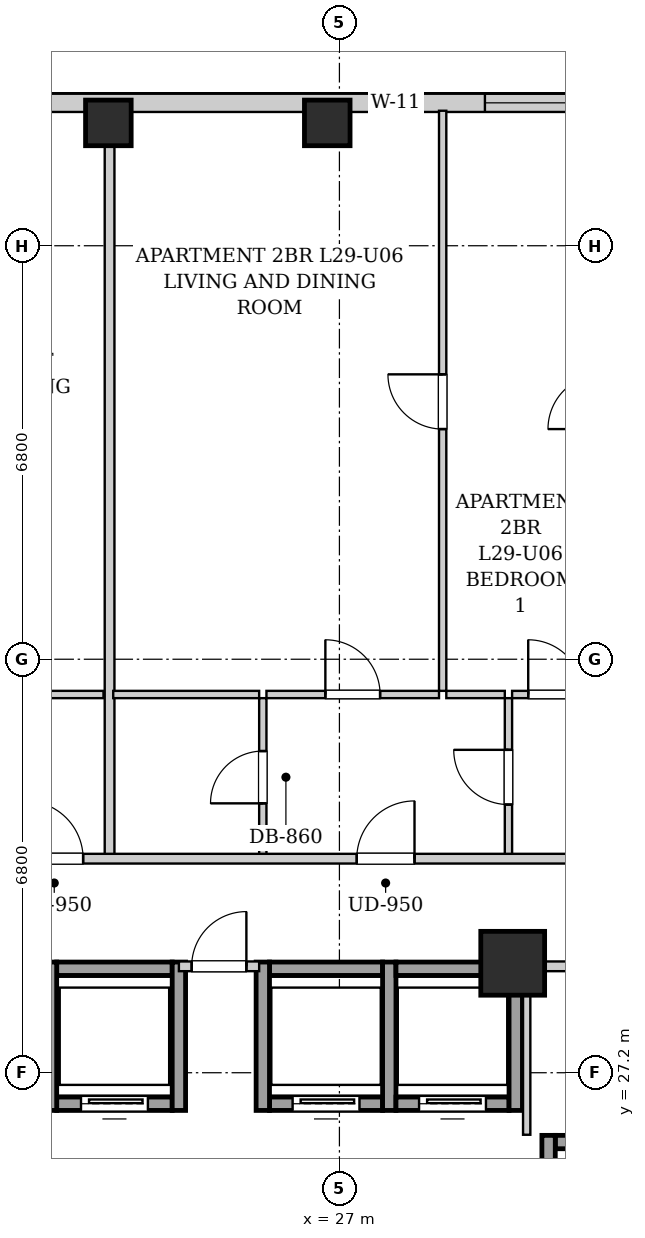
"""IFC4 building model, lengths in metres.
Left out: names, types, materials, properties, quantities, classifications, styles, units other than length and angle.
Written with IfcOpenShell. Run it as: python <this file> out.ifc"""

import sys

from ifc_helpers import new_model, si_unit, direction, frame, frame_2d, origin, origin_2d, place, context, subcontext, project, spatial, rectangle, extrude, element, fill, save


model = new_model("IFC4")
c1 = context("Model", 3, precision=1e-05, world=origin(), true_north=direction((0.0, 1.0)))
c2 = subcontext(c1, "Body", "Model", "MODEL_VIEW")
j1 = project(units=[si_unit("LENGTHUNIT", "METRE"), si_unit("PLANEANGLEUNIT", "RADIAN")], contexts=[c1])
p1 = place(None, origin())
s1 = spatial("IfcSite", under=j1, at=p1, CompositionType="ELEMENT")
p2 = place(p1, origin())
s2 = spatial("IfcBuilding", under=s1, at=p2, CompositionType="ELEMENT")
p3 = place(p2, frame((0.0, 0.0, 103.9)))
s3 = spatial("IfcBuildingStorey", under=s2, at=p3, CompositionType="ELEMENT", Elevation=103.9)
for number, where, z_axis, x_axis in (
    (1, (23.2, 42.82, 0.0), (0.0, 0.0, 1.0), (1.0, 0.0, 0.0)),
    (2, (26.8, 42.82, 0.0), (0.0, 0.0, 1.0), (1.0, 0.0, 0.0)),
):
    element("IfcColumn", number, at=place(p3, frame(where, z_axis=z_axis, x_axis=x_axis)), inside=s3, PredefinedType="COLUMN", context=c2, shape_type="SweptSolid", body=[
        extrude(rectangle(XDim=0.75, YDim=0.75, at=origin_2d()), origin(), (0.0, 0.0, 1.0), 3.2),
    ])
p4 = place(p3, frame((29.85, 29.0, 0.0), z_axis=(0.0, 0.0, 1.0), x_axis=(1.0, 0.0, 0.0)))
e3 = element("IfcColumn", 3, at=p4, inside=s3, PredefinedType="COLUMN", context=c2, shape_type="SweptSolid", body=[
    extrude(rectangle(XDim=1.05, YDim=1.05, at=origin_2d()), origin(), (0.0, 0.0, 1.0), 3.2),
])
p5 = place(p3, frame((10.0, 43.15, 0.0), z_axis=(0.0, 0.0, 1.0), x_axis=(1.0, 0.0, 0.0)))
e4 = element("IfcWall", 4, at=p5, inside=s3, PredefinedType="SOLIDWALL", context=c2, shape_type="SweptSolid", body=[
    extrude(rectangle(XDim=23.15, YDim=0.3, at=frame_2d((11.575, 0.0))), origin(), (0.0, 0.0, 1.0), 2.94),
])
p6 = place(p5, frame((4.735, 0.0, 0.55)))
e5 = element("IfcOpeningElement", 5, at=p6, cuts=e4, PredefinedType="OPENING", context=c2, shape_type="SweptSolid", body=[
    extrude(rectangle(XDim=1.35, YDim=1.2, at=frame_2d((0.675, 0.6))), frame((0.0, 0.16, 0.0), z_axis=(0.0, -1.0, 0.0), x_axis=(1.0, 0.0, 0.0)), (0.0, 0.0, 1.0), 0.32),
])
p7 = place(p5, frame((1.27, 0.0, 0.55)))
e6 = element("IfcOpeningElement", 6, at=p7, cuts=e4, PredefinedType="OPENING", context=c2, shape_type="SweptSolid", body=[
    extrude(rectangle(XDim=1.35, YDim=1.2, at=frame_2d((0.675, 0.6))), frame((0.0, 0.16, 0.0), z_axis=(0.0, -1.0, 0.0), x_axis=(1.0, 0.0, 0.0)), (0.0, 0.0, 1.0), 0.32),
])
p8 = place(p5, frame((9.773, 0.0, 0.55)))
e7 = element("IfcOpeningElement", 7, at=p8, cuts=e4, PredefinedType="OPENING", context=c2, shape_type="SweptSolid", body=[
    extrude(rectangle(XDim=1.35, YDim=1.2, at=frame_2d((0.675, 0.6))), frame((0.0, 0.16, 0.0), z_axis=(0.0, -1.0, 0.0), x_axis=(1.0, 0.0, 0.0)), (0.0, 0.0, 1.0), 0.32),
])
p9 = place(p5, frame((17.5, 0.0, 0.55)))
e8 = element("IfcOpeningElement", 8, at=p9, cuts=e4, PredefinedType="OPENING", context=c2, shape_type="SweptSolid", body=[
    extrude(rectangle(XDim=0.85, YDim=1.2, at=frame_2d((0.425, 0.6))), frame((0.0, 0.16, 0.0), z_axis=(0.0, -1.0, 0.0), x_axis=(1.0, 0.0, 0.0)), (0.0, 0.0, 1.0), 0.32),
])
p10 = place(p5, frame((19.393, 0.0, 0.55)))
e9 = element("IfcOpeningElement", 9, at=p10, cuts=e4, PredefinedType="OPENING", context=c2, shape_type="SweptSolid", body=[
    extrude(rectangle(XDim=1.35, YDim=1.2, at=frame_2d((0.675, 0.6))), frame((0.0, 0.16, 0.0), z_axis=(0.0, -1.0, 0.0), x_axis=(1.0, 0.0, 0.0)), (0.0, 0.0, 1.0), 0.32),
])
p11 = place(p3, frame((22.35, 26.69, 0.0), z_axis=(0.0, 0.0, 1.0), x_axis=(1.0, 0.0, 0.0)))
e10 = element("IfcWall", 10, at=p11, inside=s3, PredefinedType="SHEAR", context=c2, shape_type="SweptSolid", body=[
    extrude(rectangle(XDim=1.9, YDim=0.22, at=frame_2d((0.95, 0.0))), origin(), (0.0, 0.0, 1.0), 2.94),
])
p12 = place(p11, frame((0.4, 0.0, 0.0)))
e11 = element("IfcOpeningElement", 11, at=p12, cuts=e10, PredefinedType="OPENING", context=c2, shape_type="SweptSolid", body=[
    extrude(rectangle(XDim=1.1, YDim=2.15, at=frame_2d((0.55, 1.075))), frame((0.0, 0.12, 0.0), z_axis=(0.0, -1.0, 0.0), x_axis=(1.0, 0.0, 0.0)), (0.0, 0.0, 1.0), 0.24),
])
p13 = place(p3, frame((22.35, 28.91, 0.0), z_axis=(0.0, 0.0, 1.0), x_axis=(1.0, 0.0, 0.0)))
e12 = element("IfcWall", 12, at=p13, inside=s3, PredefinedType="SHEAR", context=c2, shape_type="SweptSolid", body=[
    extrude(rectangle(XDim=1.9, YDim=0.22, at=frame_2d((0.95, 0.0))), origin(), (0.0, 0.0, 1.0), 2.94),
])
for number, where, z_axis, x_axis in (
    (13, (22.24, 26.58, 0.0), (0.0, 0.0, 1.0), (0.0, 1.0, 0.0)),
    (14, (24.36, 26.58, 0.0), (0.0, 0.0, 1.0), (0.0, 1.0, 0.0)),
):
    element("IfcWall", number, at=place(p3, frame(where, z_axis=z_axis, x_axis=x_axis)), inside=s3, PredefinedType="SHEAR", context=c2, shape_type="SweptSolid", body=[
        extrude(rectangle(XDim=2.44, YDim=0.22, at=frame_2d((1.22, 0.0))), origin(), (0.0, 0.0, 1.0), 2.94),
    ])
p14 = place(p3, frame((25.85, 26.69, 0.0), z_axis=(0.0, 0.0, 1.0), x_axis=(1.0, 0.0, 0.0)))
e15 = element("IfcWall", 15, at=p14, inside=s3, PredefinedType="SHEAR", context=c2, shape_type="SweptSolid", body=[
    extrude(rectangle(XDim=1.86, YDim=0.22, at=frame_2d((0.93, 0.0))), origin(), (0.0, 0.0, 1.0), 2.94),
])
p15 = place(p14, frame((0.38, 0.0, 0.0)))
e16 = element("IfcOpeningElement", 16, at=p15, cuts=e15, PredefinedType="OPENING", context=c2, shape_type="SweptSolid", body=[
    extrude(rectangle(XDim=1.1, YDim=2.15, at=frame_2d((0.55, 1.075))), frame((0.0, 0.12, 0.0), z_axis=(0.0, -1.0, 0.0), x_axis=(1.0, 0.0, 0.0)), (0.0, 0.0, 1.0), 0.24),
])
p16 = place(p3, frame((25.85, 28.91, 0.0), z_axis=(0.0, 0.0, 1.0), x_axis=(1.0, 0.0, 0.0)))
e17 = element("IfcWall", 17, at=p16, inside=s3, PredefinedType="SHEAR", context=c2, shape_type="SweptSolid", body=[
    extrude(rectangle(XDim=1.86, YDim=0.22, at=frame_2d((0.93, 0.0))), origin(), (0.0, 0.0, 1.0), 2.94),
])
for number, where, z_axis, x_axis in (
    (18, (25.74, 26.58, 0.0), (0.0, 0.0, 1.0), (0.0, 1.0, 0.0)),
    (19, (27.82, 26.58, 0.0), (0.0, 0.0, 1.0), (0.0, 1.0, 0.0)),
):
    element("IfcWall", number, at=place(p3, frame(where, z_axis=z_axis, x_axis=x_axis)), inside=s3, PredefinedType="SHEAR", context=c2, shape_type="SweptSolid", body=[
        extrude(rectangle(XDim=2.44, YDim=0.22, at=frame_2d((1.22, 0.0))), origin(), (0.0, 0.0, 1.0), 2.94),
    ])
p17 = place(p3, frame((27.93, 26.69, 0.0), z_axis=(0.0, 0.0, 1.0), x_axis=(1.0, 0.0, 0.0)))
e20 = element("IfcWall", 20, at=p17, inside=s3, PredefinedType="SHEAR", context=c2, shape_type="SweptSolid", body=[
    extrude(rectangle(XDim=1.86, YDim=0.22, at=frame_2d((0.93, 0.0))), origin(), (0.0, 0.0, 1.0), 2.94),
])
p18 = place(p17, frame((0.38, 0.0, 0.0)))
e21 = element("IfcOpeningElement", 21, at=p18, cuts=e20, PredefinedType="OPENING", context=c2, shape_type="SweptSolid", body=[
    extrude(rectangle(XDim=1.1, YDim=2.15, at=frame_2d((0.55, 1.075))), frame((0.0, 0.12, 0.0), z_axis=(0.0, -1.0, 0.0), x_axis=(1.0, 0.0, 0.0)), (0.0, 0.0, 1.0), 0.24),
])
p19 = place(p3, frame((27.93, 28.91, 0.0), z_axis=(0.0, 0.0, 1.0), x_axis=(1.0, 0.0, 0.0)))
e22 = element("IfcWall", 22, at=p19, inside=s3, PredefinedType="SHEAR", context=c2, shape_type="SweptSolid", body=[
    extrude(rectangle(XDim=1.86, YDim=0.22, at=frame_2d((0.93, 0.0))), origin(), (0.0, 0.0, 1.0), 2.94),
])
p20 = place(p3, frame((29.9, 26.58, 0.0), z_axis=(0.0, 0.0, 1.0), x_axis=(0.0, 1.0, 0.0)))
e23 = element("IfcWall", 23, at=p20, inside=s3, PredefinedType="SHEAR", context=c2, shape_type="SweptSolid", body=[
    extrude(rectangle(XDim=2.44, YDim=0.22, at=frame_2d((1.22, 0.0))), origin(), (0.0, 0.0, 1.0), 2.94),
])
p21 = place(p3, frame((30.55, 26.06, 0.0), z_axis=(0.0, 0.0, 1.0), x_axis=(1.0, 0.0, 0.0)))
e24 = element("IfcWall", 24, at=p21, inside=s3, PredefinedType="SHEAR", context=c2, shape_type="SweptSolid", body=[
    extrude(rectangle(XDim=1.9, YDim=0.22, at=frame_2d((0.95, 0.0))), origin(), (0.0, 0.0, 1.0), 2.94),
])
p22 = place(p3, frame((30.44, 24.1, 0.0), z_axis=(0.0, 0.0, 1.0), x_axis=(0.0, 1.0, 0.0)))
e25 = element("IfcWall", 25, at=p22, inside=s3, PredefinedType="SHEAR", context=c2, shape_type="SweptSolid", body=[
    extrude(rectangle(XDim=2.07, YDim=0.22, at=frame_2d((1.035, 0.0))), origin(), (0.0, 0.0, 1.0), 2.94),
])
p23 = place(p3, frame((24.36, 28.95, 0.0), z_axis=(0.0, 0.0, 1.0), x_axis=(1.0, 0.0, 0.0)))
e26 = element("IfcWall", 26, at=p23, inside=s3, PredefinedType="PARTITIONING", context=c2, shape_type="SweptSolid", body=[
    extrude(rectangle(XDim=1.32, YDim=0.16, at=frame_2d((0.66, 0.0))), origin(), (0.0, 0.0, 1.0), 2.313),
])
p24 = place(p23, frame((0.21, 0.0, 0.0)))
e27 = element("IfcOpeningElement", 27, at=p24, cuts=e26, PredefinedType="OPENING", context=c2, shape_type="SweptSolid", body=[
    extrude(rectangle(XDim=0.9, YDim=2.05, at=frame_2d((0.45, 1.025))), frame((0.0, 0.09, 0.0), z_axis=(0.0, -1.0, 0.0), x_axis=(1.0, 0.0, 0.0)), (0.0, 0.0, 1.0), 0.18),
])
p25 = place(p3, frame((30.08, 26.18, 0.0), z_axis=(0.0, 0.0, 1.0), x_axis=(0.0, 1.0, 0.0)))
e28 = element("IfcWall", 28, at=p25, inside=s3, PredefinedType="PARTITIONING", context=c2, shape_type="SweptSolid", body=[
    extrude(rectangle(XDim=2.68, YDim=0.12, at=frame_2d((1.34, 0.0))), origin(), (0.0, 0.0, 1.0), 2.94),
])
p26 = place(p3, frame((30.08, 28.95, 0.0), z_axis=(0.0, 0.0, 1.0), x_axis=(1.0, 0.0, 0.0)))
e29 = element("IfcWall", 29, at=p26, inside=s3, PredefinedType="PARTITIONING", context=c2, shape_type="SweptSolid", body=[
    extrude(rectangle(XDim=2.96, YDim=0.16, at=frame_2d((1.48, 0.0))), origin(), (0.0, 0.0, 1.0), 2.94),
])
p27 = place(p26, frame((1.045, 0.0, 0.0)))
e30 = element("IfcOpeningElement", 30, at=p27, cuts=e29, PredefinedType="OPENING", context=c2, shape_type="SweptSolid", body=[
    extrude(rectangle(XDim=0.86, YDim=2.05, at=frame_2d((0.43, 1.025))), frame((0.0, 0.09, 0.0), z_axis=(0.0, -1.0, 0.0), x_axis=(1.0, 0.0, 0.0)), (0.0, 0.0, 1.0), 0.18),
])
p28 = place(p3, frame((19.85, 33.42, 0.0), z_axis=(0.0, 0.0, 1.0), x_axis=(1.0, 0.0, 0.0)))
e31 = element("IfcWall", 31, at=p28, inside=s3, PredefinedType="PARTITIONING", context=c2, shape_type="SweptSolid", body=[
    extrude(rectangle(XDim=3.27, YDim=0.12, at=frame_2d((1.635, 0.0))), origin(), (0.0, 0.0, 1.0), 2.94),
])
p29 = place(p28, frame((1.185, 0.0, 0.0)))
e32 = element("IfcOpeningElement", 32, at=p29, cuts=e31, PredefinedType="OPENING", context=c2, shape_type="SweptSolid", body=[
    extrude(rectangle(XDim=0.9, YDim=2.05, at=frame_2d((0.45, 1.025))), frame((0.0, 0.07, 0.0), z_axis=(0.0, -1.0, 0.0), x_axis=(1.0, 0.0, 0.0)), (0.0, 0.0, 1.0), 0.14),
])
p30 = place(p3, frame((23.22, 30.76, 0.0), z_axis=(0.0, 0.0, 1.0), x_axis=(0.0, 1.0, 0.0)))
e33 = element("IfcWall", 33, at=p30, inside=s3, PredefinedType="PARTITIONING", context=c2, shape_type="SweptSolid", body=[
    extrude(rectangle(XDim=12.26, YDim=0.16, at=frame_2d((6.13, 0.0))), origin(), (0.0, 0.0, 1.0), 2.94),
])
p31 = place(p3, frame((25.74, 30.76, 0.0), z_axis=(0.0, 0.0, 1.0), x_axis=(0.0, 1.0, 0.0)))
e34 = element("IfcWall", 34, at=p31, inside=s3, PredefinedType="PARTITIONING", context=c2, shape_type="SweptSolid", body=[
    extrude(rectangle(XDim=2.6, YDim=0.12, at=frame_2d((1.3, 0.0))), origin(), (0.0, 0.0, 1.0), 2.94),
])
p32 = place(p31, frame((0.87, 0.0, 0.0)))
e35 = element("IfcOpeningElement", 35, at=p32, cuts=e34, PredefinedType="OPENING", context=c2, shape_type="SweptSolid", body=[
    extrude(rectangle(XDim=0.86, YDim=2.05, at=frame_2d((0.43, 1.025))), frame((0.0, 0.07, 0.0), z_axis=(0.0, -1.0, 0.0), x_axis=(1.0, 0.0, 0.0)), (0.0, 0.0, 1.0), 0.14),
])
p33 = place(p3, frame((23.28, 33.42, 0.0), z_axis=(0.0, 0.0, 1.0), x_axis=(1.0, 0.0, 0.0)))
e36 = element("IfcWall", 36, at=p33, inside=s3, PredefinedType="PARTITIONING", context=c2, shape_type="SweptSolid", body=[
    extrude(rectangle(XDim=2.4, YDim=0.12, at=frame_2d((1.2, 0.0))), origin(), (0.0, 0.0, 1.0), 2.94),
])
p34 = place(p3, frame((29.78, 30.76, 0.0), z_axis=(0.0, 0.0, 1.0), x_axis=(0.0, 1.0, 0.0)))
e37 = element("IfcWall", 37, at=p34, inside=s3, PredefinedType="PARTITIONING", context=c2, shape_type="SweptSolid", body=[
    extrude(rectangle(XDim=2.6, YDim=0.12, at=frame_2d((1.3, 0.0))), origin(), (0.0, 0.0, 1.0), 2.94),
])
p35 = place(p34, frame((0.85, 0.0, 0.0)))
e38 = element("IfcOpeningElement", 38, at=p35, cuts=e37, PredefinedType="OPENING", context=c2, shape_type="SweptSolid", body=[
    extrude(rectangle(XDim=0.9, YDim=2.05, at=frame_2d((0.45, 1.025))), frame((0.0, 0.07, 0.0), z_axis=(0.0, -1.0, 0.0), x_axis=(1.0, 0.0, 0.0)), (0.0, 0.0, 1.0), 0.14),
])
p36 = place(p3, frame((25.8, 33.42, 0.0), z_axis=(0.0, 0.0, 1.0), x_axis=(1.0, 0.0, 0.0)))
e39 = element("IfcWall", 39, at=p36, inside=s3, PredefinedType="PARTITIONING", context=c2, shape_type="SweptSolid", body=[
    extrude(rectangle(XDim=2.838, YDim=0.12, at=frame_2d((1.419, 0.0))), origin(), (0.0, 0.0, 1.0), 2.94),
])
p37 = place(p36, frame((0.969, 0.0, 0.0)))
e40 = element("IfcOpeningElement", 40, at=p37, cuts=e39, PredefinedType="OPENING", context=c2, shape_type="SweptSolid", body=[
    extrude(rectangle(XDim=0.9, YDim=2.05, at=frame_2d((0.45, 1.025))), frame((0.0, 0.07, 0.0), z_axis=(0.0, -1.0, 0.0), x_axis=(1.0, 0.0, 0.0)), (0.0, 0.0, 1.0), 0.14),
])
p38 = place(p3, frame((28.758, 33.42, 0.0), z_axis=(0.0, 0.0, 1.0), x_axis=(1.0, 0.0, 0.0)))
e41 = element("IfcWall", 41, at=p38, inside=s3, PredefinedType="PARTITIONING", context=c2, shape_type="SweptSolid", body=[
    extrude(rectangle(XDim=0.962, YDim=0.12, at=frame_2d((0.481, 0.0))), origin(), (0.0, 0.0, 1.0), 2.94),
])
p39 = place(p3, frame((29.84, 33.42, 0.0), z_axis=(0.0, 0.0, 1.0), x_axis=(1.0, 0.0, 0.0)))
e42 = element("IfcWall", 42, at=p39, inside=s3, PredefinedType="PARTITIONING", context=c2, shape_type="SweptSolid", body=[
    extrude(rectangle(XDim=1.43, YDim=0.12, at=frame_2d((0.715, 0.0))), origin(), (0.0, 0.0, 1.0), 2.94),
])
p40 = place(p39, frame((0.265, 0.0, 0.0)))
e43 = element("IfcOpeningElement", 43, at=p40, cuts=e42, PredefinedType="OPENING", context=c2, shape_type="SweptSolid", body=[
    extrude(rectangle(XDim=0.9, YDim=2.05, at=frame_2d((0.45, 1.025))), frame((0.0, 0.07, 0.0), z_axis=(0.0, -1.0, 0.0), x_axis=(1.0, 0.0, 0.0)), (0.0, 0.0, 1.0), 0.14),
])
p41 = place(p3, frame((28.698, 33.48, 0.0), z_axis=(0.0, 0.0, 1.0), x_axis=(0.0, 1.0, 0.0)))
e44 = element("IfcWall", 44, at=p41, inside=s3, PredefinedType="PARTITIONING", context=c2, shape_type="SweptSolid", body=[
    extrude(rectangle(XDim=9.54, YDim=0.12, at=frame_2d((4.77, 0.0))), origin(), (0.0, 0.0, 1.0), 2.94),
])
p42 = place(p41, frame((4.305, 0.0, 0.0)))
e45 = element("IfcOpeningElement", 45, at=p42, cuts=e44, PredefinedType="OPENING", context=c2, shape_type="SweptSolid", body=[
    extrude(rectangle(XDim=0.9, YDim=2.05, at=frame_2d((0.45, 1.025))), frame((0.0, 0.07, 0.0), z_axis=(0.0, -1.0, 0.0), x_axis=(1.0, 0.0, 0.0)), (0.0, 0.0, 1.0), 0.14),
])
p43 = place(p3, frame((10.05, 30.72, 0.0), z_axis=(0.0, 0.0, 1.0), x_axis=(1.0, 0.0, 0.0)))
e46 = element("IfcWall", 46, at=p43, inside=s3, PredefinedType="PARTITIONING", context=c2, shape_type="SweptSolid", body=[
    extrude(rectangle(XDim=30.8, YDim=0.16, at=frame_2d((15.4, 0.0))), origin(), (0.0, 0.0, 1.0), 2.94),
])
p44 = place(p43, frame((3.692, 0.0, 0.0)))
e47 = element("IfcOpeningElement", 47, at=p44, cuts=e46, PredefinedType="OPENING", context=c2, shape_type="SweptSolid", body=[
    extrude(rectangle(XDim=0.95, YDim=2.1, at=frame_2d((0.475, 1.05))), frame((0.0, 0.09, 0.0), z_axis=(0.0, -1.0, 0.0), x_axis=(1.0, 0.0, 0.0)), (0.0, 0.0, 1.0), 0.18),
])
p45 = place(p43, frame((11.785, 0.0, 0.0)))
e48 = element("IfcOpeningElement", 48, at=p45, cuts=e46, PredefinedType="OPENING", context=c2, shape_type="SweptSolid", body=[
    extrude(rectangle(XDim=0.95, YDim=2.1, at=frame_2d((0.475, 1.05))), frame((0.0, 0.09, 0.0), z_axis=(0.0, -1.0, 0.0), x_axis=(1.0, 0.0, 0.0)), (0.0, 0.0, 1.0), 0.18),
])
p46 = place(p43, frame((17.235, 0.0, 0.0)))
e49 = element("IfcOpeningElement", 49, at=p46, cuts=e46, PredefinedType="OPENING", context=c2, shape_type="SweptSolid", body=[
    extrude(rectangle(XDim=0.95, YDim=2.1, at=frame_2d((0.475, 1.05))), frame((0.0, 0.09, 0.0), z_axis=(0.0, -1.0, 0.0), x_axis=(1.0, 0.0, 0.0)), (0.0, 0.0, 1.0), 0.18),
])
p47 = place(p43, frame((28.64, 0.0, 0.0)))
e50 = element("IfcOpeningElement", 50, at=p47, cuts=e46, PredefinedType="OPENING", context=c2, shape_type="SweptSolid", body=[
    extrude(rectangle(XDim=0.95, YDim=2.1, at=frame_2d((0.475, 1.05))), frame((0.0, 0.09, 0.0), z_axis=(0.0, -1.0, 0.0), x_axis=(1.0, 0.0, 0.0)), (0.0, 0.0, 1.0), 0.18),
])
p48 = place(p12, origin())
e51 = element("IfcDoor", 51, at=p48, inside=s3, OperationType="SLIDING_TO_LEFT", PredefinedType="DOOR", context=c2, shape_type="SweptSolid", body=[
    extrude(rectangle(XDim=1.1, YDim=2.15, at=frame_2d((0.55, 1.075))), frame((0.0, 0.025, 0.0), z_axis=(0.0, -1.0, 0.0), x_axis=(1.0, 0.0, 0.0)), (0.0, 0.0, 1.0), 0.05),
])
fill(e11, e51)
p49 = place(p15, origin())
e52 = element("IfcDoor", 52, at=p49, inside=s3, OperationType="SLIDING_TO_LEFT", PredefinedType="DOOR", context=c2, shape_type="SweptSolid", body=[
    extrude(rectangle(XDim=1.1, YDim=2.15, at=frame_2d((0.55, 1.075))), frame((0.0, 0.025, 0.0), z_axis=(0.0, -1.0, 0.0), x_axis=(1.0, 0.0, 0.0)), (0.0, 0.0, 1.0), 0.05),
])
fill(e16, e52)
p50 = place(p18, origin())
e53 = element("IfcDoor", 53, at=p50, inside=s3, OperationType="SLIDING_TO_LEFT", PredefinedType="DOOR", context=c2, shape_type="SweptSolid", body=[
    extrude(rectangle(XDim=1.1, YDim=2.15, at=frame_2d((0.55, 1.075))), frame((0.0, 0.025, 0.0), z_axis=(0.0, -1.0, 0.0), x_axis=(1.0, 0.0, 0.0)), (0.0, 0.0, 1.0), 0.05),
])
fill(e21, e53)
p51 = place(p24, origin())
e54 = element("IfcDoor", 54, at=p51, inside=s3, OperationType="SINGLE_SWING_RIGHT", PredefinedType="DOOR", context=c2, shape_type="SweptSolid", body=[
    extrude(rectangle(XDim=0.9, YDim=2.05, at=frame_2d((0.45, 1.025))), frame((0.0, 0.025, 0.0), z_axis=(0.0, -1.0, 0.0), x_axis=(1.0, 0.0, 0.0)), (0.0, 0.0, 1.0), 0.05),
])
fill(e27, e54)
p52 = place(p32, origin())
e55 = element("IfcDoor", 55, at=p52, inside=s3, OperationType="SINGLE_SWING_LEFT", PredefinedType="DOOR", context=c2, shape_type="SweptSolid", body=[
    extrude(rectangle(XDim=0.86, YDim=2.05, at=frame_2d((0.43, 1.025))), frame((0.0, 0.025, 0.0), z_axis=(0.0, -1.0, 0.0), x_axis=(1.0, 0.0, 0.0)), (0.0, 0.0, 1.0), 0.05),
])
fill(e35, e55)
p53 = place(p35, origin())
e56 = element("IfcDoor", 56, at=p53, inside=s3, OperationType="SINGLE_SWING_RIGHT", PredefinedType="DOOR", context=c2, shape_type="SweptSolid", body=[
    extrude(rectangle(XDim=0.9, YDim=2.05, at=frame_2d((0.45, 1.025))), frame((0.0, 0.025, 0.0), z_axis=(0.0, -1.0, 0.0), x_axis=(1.0, 0.0, 0.0)), (0.0, 0.0, 1.0), 0.05),
])
fill(e38, e56)
p54 = place(p37, origin())
e57 = element("IfcDoor", 57, at=p54, inside=s3, OperationType="SINGLE_SWING_LEFT", PredefinedType="DOOR", context=c2, shape_type="SweptSolid", body=[
    extrude(rectangle(XDim=0.9, YDim=2.05, at=frame_2d((0.45, 1.025))), frame((0.0, 0.025, 0.0), z_axis=(0.0, -1.0, 0.0), x_axis=(1.0, 0.0, 0.0)), (0.0, 0.0, 1.0), 0.05),
])
fill(e40, e57)
p55 = place(p40, origin())
e58 = element("IfcDoor", 58, at=p55, inside=s3, OperationType="SINGLE_SWING_LEFT", PredefinedType="DOOR", context=c2, shape_type="SweptSolid", body=[
    extrude(rectangle(XDim=0.9, YDim=2.05, at=frame_2d((0.45, 1.025))), frame((0.0, 0.025, 0.0), z_axis=(0.0, -1.0, 0.0), x_axis=(1.0, 0.0, 0.0)), (0.0, 0.0, 1.0), 0.05),
])
fill(e43, e58)
p56 = place(p42, origin())
e59 = element("IfcDoor", 59, at=p56, inside=s3, OperationType="SINGLE_SWING_RIGHT", PredefinedType="DOOR", context=c2, shape_type="SweptSolid", body=[
    extrude(rectangle(XDim=0.9, YDim=2.05, at=frame_2d((0.45, 1.025))), frame((0.0, 0.025, 0.0), z_axis=(0.0, -1.0, 0.0), x_axis=(1.0, 0.0, 0.0)), (0.0, 0.0, 1.0), 0.05),
])
fill(e45, e59)
p57 = place(p45, origin())
e60 = element("IfcDoor", 60, at=p57, inside=s3, OperationType="SINGLE_SWING_LEFT", PredefinedType="DOOR", context=c2, shape_type="SweptSolid", body=[
    extrude(rectangle(XDim=0.95, YDim=2.1, at=frame_2d((0.475, 1.05))), frame((0.0, 0.025, 0.0), z_axis=(0.0, -1.0, 0.0), x_axis=(1.0, 0.0, 0.0)), (0.0, 0.0, 1.0), 0.05),
])
fill(e48, e60)
p58 = place(p46, origin())
e61 = element("IfcDoor", 61, at=p58, inside=s3, OperationType="SINGLE_SWING_RIGHT", PredefinedType="DOOR", context=c2, shape_type="SweptSolid", body=[
    extrude(rectangle(XDim=0.95, YDim=2.1, at=frame_2d((0.475, 1.05))), frame((0.0, 0.025, 0.0), z_axis=(0.0, -1.0, 0.0), x_axis=(1.0, 0.0, 0.0)), (0.0, 0.0, 1.0), 0.05),
])
fill(e49, e61)
p59 = place(p9, origin())
e62 = element("IfcWindow", 62, at=p59, inside=s3, PartitioningType="SINGLE_PANEL", PredefinedType="WINDOW", context=c2, shape_type="SweptSolid", body=[
    extrude(rectangle(XDim=0.85, YDim=1.2, at=frame_2d((0.425, 0.6))), frame((0.0, 0.03, 0.0), z_axis=(0.0, -1.0, 0.0), x_axis=(1.0, 0.0, 0.0)), (0.0, 0.0, 1.0), 0.06),
])
fill(e8, e62)
p60 = place(p10, origin())
e63 = element("IfcWindow", 63, at=p60, inside=s3, PartitioningType="SINGLE_PANEL", PredefinedType="WINDOW", context=c2, shape_type="SweptSolid", body=[
    extrude(rectangle(XDim=1.35, YDim=1.2, at=frame_2d((0.675, 0.6))), frame((0.0, 0.03, 0.0), z_axis=(0.0, -1.0, 0.0), x_axis=(1.0, 0.0, 0.0)), (0.0, 0.0, 1.0), 0.06),
])
fill(e9, e63)
save(model, sys.argv[1])
